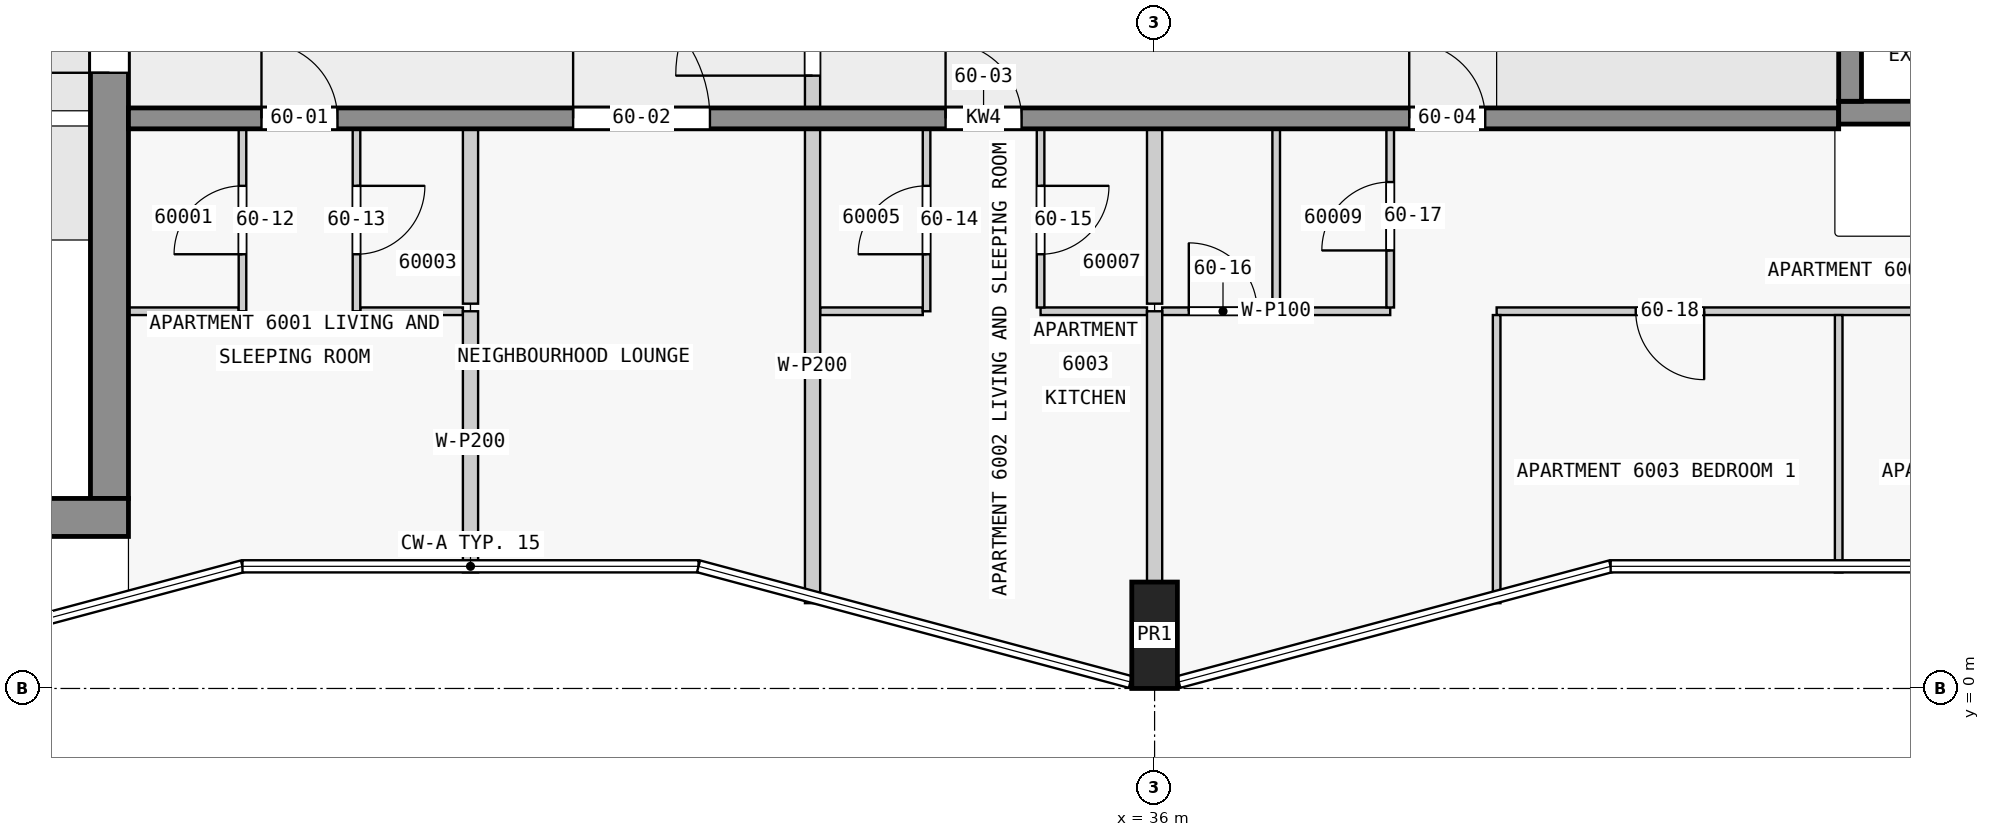
"""IFC4 building model, lengths in metres.
Left out: names, types, materials, properties, quantities, classifications, styles, units other than length and angle.
Written with IfcOpenShell. Run it as: python <this file> out.ifc"""

import sys

from ifc_helpers import new_model, si_unit, direction, frame, frame_2d, origin, origin_2d, place, context, subcontext, project, spatial, rectangle, extrude, element, fill, save


model = new_model("IFC4")
c1 = context("Model", 3, precision=1e-05, world=origin(), true_north=direction((0.0, 1.0)))
c2 = subcontext(c1, "Body", "Model", "MODEL_VIEW")
j1 = project(units=[si_unit("LENGTHUNIT", "METRE"), si_unit("PLANEANGLEUNIT", "RADIAN")], contexts=[c1])
p1 = place(None, origin())
s1 = spatial("IfcSite", under=j1, at=p1, CompositionType="ELEMENT")
p2 = place(p1, origin())
s2 = spatial("IfcBuilding", under=s1, at=p2, CompositionType="ELEMENT")
p3 = place(p2, frame((0.0, 0.0, 229.4)))
s3 = spatial("IfcBuildingStorey", under=s2, at=p3, CompositionType="ELEMENT", Elevation=229.4)
p4 = place(p3, frame((36.0, 0.7, 0.0), z_axis=(0.0, 0.0, 1.0), x_axis=(1.0, 0.0, 0.0)))
e1 = element("IfcColumn", 1, at=p4, inside=s3, PredefinedType="COLUMN", context=c2, shape_type="SweptSolid", body=[
    extrude(rectangle(XDim=0.6, YDim=1.4, at=origin_2d()), origin(), (0.0, 0.0, 1.0), 3.5),
])
p5 = place(p3, frame((1.8, 2.25, 0.0), z_axis=(0.0, 0.0, 1.0), x_axis=(1.0, 0.0, 0.0)))
e2 = element("IfcWall", 2, at=p5, inside=s3, PredefinedType="SHEAR", context=c2, shape_type="SweptSolid", body=[
    extrude(rectangle(XDim=20.7, YDim=0.5, at=frame_2d((10.35, 0.0))), origin(), (0.0, 0.0, 1.0), 3.25),
])
p6 = place(p3, frame((22.25, 2.5, 0.0), z_axis=(0.0, 0.0, 1.0), x_axis=(0.0, 1.0, 0.0)))
e3 = element("IfcWall", 3, at=p6, inside=s3, PredefinedType="SHEAR", context=c2, shape_type="SweptSolid", body=[
    extrude(rectangle(XDim=15.0, YDim=0.5, at=frame_2d((7.5, 0.0))), origin(), (0.0, 0.0, 1.0), 3.25),
])
p7 = place(p6, frame((5.6, 0.0, 0.0)))
e4 = element("IfcOpeningElement", 4, at=p7, cuts=e3, PredefinedType="OPENING", context=c2, shape_type="SweptSolid", body=[
    extrude(rectangle(XDim=1.8, YDim=2.1, at=frame_2d((0.9, 1.05))), frame((0.0, 0.26, 0.0), z_axis=(0.0, -1.0, 0.0), x_axis=(1.0, 0.0, 0.0)), (0.0, 0.0, 1.0), 0.52),
])
p8 = place(p3, frame((45.15, 7.725, 0.0), z_axis=(0.0, 0.0, 1.0), x_axis=(0.0, 1.0, 0.0)))
e5 = element("IfcWall", 5, at=p8, inside=s3, PredefinedType="SHEAR", context=c2, shape_type="SweptSolid", body=[
    extrude(rectangle(XDim=2.55, YDim=0.3, at=frame_2d((1.275, 0.0))), origin(), (0.0, 0.0, 1.0), 3.5),
])
p9 = place(p8, frame((0.725, 0.0, 0.0)))
e6 = element("IfcOpeningElement", 6, at=p9, cuts=e5, PredefinedType="OPENING", context=c2, shape_type="SweptSolid", body=[
    extrude(rectangle(XDim=1.1, YDim=2.1, at=frame_2d((0.55, 1.05))), frame((0.0, 0.16, 0.0), z_axis=(0.0, -1.0, 0.0), x_axis=(1.0, 0.0, 0.0)), (0.0, 0.0, 1.0), 0.32),
])
p10 = place(p3, frame((45.0, 7.575, 0.0), z_axis=(0.0, 0.0, 1.0), x_axis=(1.0, 0.0, 0.0)))
e7 = element("IfcWall", 7, at=p10, inside=s3, PredefinedType="SHEAR", context=c2, shape_type="SweptSolid", body=[
    extrude(rectangle(XDim=7.2, YDim=0.3, at=frame_2d((3.6, 0.0))), origin(), (0.0, 0.0, 1.0), 3.5),
])
p11 = place(p3, frame((22.5, 7.5, 0.0), z_axis=(0.0, 0.0, 1.0), x_axis=(1.0, 0.0, 0.0)))
e8 = element("IfcWall", 8, at=p11, inside=s3, PredefinedType="SHEAR", context=c2, shape_type="SweptSolid", body=[
    extrude(rectangle(XDim=22.5, YDim=0.275, at=frame_2d((11.25, 0.0))), origin(), (0.0, 0.0, 1.0), 3.25),
])
p12 = place(p11, frame((1.75, 0.0, 0.0)))
e9 = element("IfcOpeningElement", 9, at=p12, cuts=e8, PredefinedType="OPENING", context=c2, shape_type="SweptSolid", body=[
    extrude(rectangle(XDim=1.0, YDim=2.1, at=frame_2d((0.5, 1.05))), frame((0.0, 0.147, 0.0), z_axis=(0.0, -1.0, 0.0), x_axis=(1.0, 0.0, 0.0)), (0.0, 0.0, 1.0), 0.295),
])
p13 = place(p11, frame((5.85, 0.0, 0.0)))
e10 = element("IfcOpeningElement", 10, at=p13, cuts=e8, PredefinedType="OPENING", context=c2, shape_type="SweptSolid", body=[
    extrude(rectangle(XDim=1.8, YDim=2.1, at=frame_2d((0.9, 1.05))), frame((0.0, 0.147, 0.0), z_axis=(0.0, -1.0, 0.0), x_axis=(1.0, 0.0, 0.0)), (0.0, 0.0, 1.0), 0.295),
])
p14 = place(p11, frame((10.75, 0.0, 0.0)))
e11 = element("IfcOpeningElement", 11, at=p14, cuts=e8, PredefinedType="OPENING", context=c2, shape_type="SweptSolid", body=[
    extrude(rectangle(XDim=1.0, YDim=2.1, at=frame_2d((0.5, 1.05))), frame((0.0, 0.147, 0.0), z_axis=(0.0, -1.0, 0.0), x_axis=(1.0, 0.0, 0.0)), (0.0, 0.0, 1.0), 0.295),
])
p15 = place(p11, frame((16.85, 0.0, 0.0)))
e12 = element("IfcOpeningElement", 12, at=p15, cuts=e8, PredefinedType="OPENING", context=c2, shape_type="SweptSolid", body=[
    extrude(rectangle(XDim=1.0, YDim=2.1, at=frame_2d((0.5, 1.05))), frame((0.0, 0.147, 0.0), z_axis=(0.0, -1.0, 0.0), x_axis=(1.0, 0.0, 0.0)), (0.0, 0.0, 1.0), 0.295),
])
p16 = place(p3, frame((54.08, 4.962, 0.0), z_axis=(0.0, 0.0, 1.0), x_axis=(-1.0, 0.0, 0.0)))
e13 = element("IfcWall", 13, at=p16, inside=s3, PredefinedType="PARTITIONING", context=c2, shape_type="SweptSolid", body=[
    extrude(rectangle(XDim=13.58, YDim=0.1, at=frame_2d((6.79, 0.0))), origin(), (0.0, 0.0, 1.0), 3.25),
])
p17 = place(p16, frame((10.85, 0.0, 0.0)))
e14 = element("IfcOpeningElement", 14, at=p17, cuts=e13, PredefinedType="OPENING", context=c2, shape_type="SweptSolid", body=[
    extrude(rectangle(XDim=0.9, YDim=2.1, at=frame_2d((0.45, 1.05))), frame((0.0, 0.06, 0.0), z_axis=(0.0, -1.0, 0.0), x_axis=(1.0, 0.0, 0.0)), (0.0, 0.0, 1.0), 0.12),
])
p18 = place(p16, frame((6.45, 0.0, 0.0)))
e15 = element("IfcOpeningElement", 15, at=p18, cuts=e13, PredefinedType="OPENING", context=c2, shape_type="SweptSolid", body=[
    extrude(rectangle(XDim=0.9, YDim=2.1, at=frame_2d((0.45, 1.05))), frame((0.0, 0.06, 0.0), z_axis=(0.0, -1.0, 0.0), x_axis=(1.0, 0.0, 0.0)), (0.0, 0.0, 1.0), 0.12),
])
p19 = place(p16, frame((1.95, 0.0, 0.0)))
e16 = element("IfcOpeningElement", 16, at=p19, cuts=e13, PredefinedType="OPENING", context=c2, shape_type="SweptSolid", body=[
    extrude(rectangle(XDim=0.9, YDim=2.1, at=frame_2d((0.45, 1.05))), frame((0.0, 0.06, 0.0), z_axis=(0.0, -1.0, 0.0), x_axis=(1.0, 0.0, 0.0)), (0.0, 0.0, 1.0), 0.12),
])
p20 = place(p3, frame((22.5, 4.962, 0.0), z_axis=(0.0, 0.0, 1.0), x_axis=(1.0, 0.0, 0.0)))
e17 = element("IfcWall", 17, at=p20, inside=s3, PredefinedType="PARTITIONING", context=c2, shape_type="SweptSolid", body=[
    extrude(rectangle(XDim=1.45, YDim=0.1, at=frame_2d((0.725, 0.0))), origin(), (0.0, 0.0, 1.0), 3.25),
])
for number, where, z_axis, x_axis in (
    (18, (25.55, 4.962, 0.0), (0.0, 0.0, 1.0), (1.0, 0.0, 0.0)),
    (19, (31.6, 4.962, 0.0), (0.0, 0.0, 1.0), (1.0, 0.0, 0.0)),
):
    element("IfcWall", number, at=place(p3, frame(where, z_axis=z_axis, x_axis=x_axis)), inside=s3, PredefinedType="PARTITIONING", context=c2, shape_type="SweptSolid", body=[
        extrude(rectangle(XDim=1.35, YDim=0.1, at=frame_2d((0.675, 0.0))), origin(), (0.0, 0.0, 1.0), 3.25),
    ])
p21 = place(p3, frame((34.5, 4.962, 0.0), z_axis=(0.0, 0.0, 1.0), x_axis=(1.0, 0.0, 0.0)))
e20 = element("IfcWall", 20, at=p21, inside=s3, PredefinedType="PARTITIONING", context=c2, shape_type="SweptSolid", body=[
    extrude(rectangle(XDim=1.4, YDim=0.1, at=frame_2d((0.7, 0.0))), origin(), (0.0, 0.0, 1.0), 3.25),
])
p22 = place(p3, frame((36.1, 4.962, 0.0), z_axis=(0.0, 0.0, 1.0), x_axis=(1.0, 0.0, 0.0)))
e21 = element("IfcWall", 21, at=p22, inside=s3, PredefinedType="PARTITIONING", context=c2, shape_type="SweptSolid", body=[
    extrude(rectangle(XDim=3.0, YDim=0.1, at=frame_2d((1.5, 0.0))), origin(), (0.0, 0.0, 1.0), 3.25),
])
p23 = place(p22, frame((0.35, 0.0, 0.0)))
e22 = element("IfcOpeningElement", 22, at=p23, cuts=e21, PredefinedType="OPENING", context=c2, shape_type="SweptSolid", body=[
    extrude(rectangle(XDim=0.9, YDim=2.1, at=frame_2d((0.45, 1.05))), frame((0.0, 0.06, 0.0), z_axis=(0.0, -1.0, 0.0), x_axis=(1.0, 0.0, 0.0)), (0.0, 0.0, 1.0), 0.12),
])
p24 = place(p3, frame((24.0, 4.962, 0.0), z_axis=(0.0, 0.0, 1.0), x_axis=(0.0, 1.0, 0.0)))
e23 = element("IfcWall", 23, at=p24, inside=s3, PredefinedType="PARTITIONING", context=c2, shape_type="SweptSolid", body=[
    extrude(rectangle(XDim=2.4, YDim=0.1, at=frame_2d((1.2, 0.0))), origin(), (0.0, 0.0, 1.0), 3.25),
])
p25 = place(p24, frame((0.75, 0.0, 0.0)))
e24 = element("IfcOpeningElement", 24, at=p25, cuts=e23, PredefinedType="OPENING", context=c2, shape_type="SweptSolid", body=[
    extrude(rectangle(XDim=0.9, YDim=2.1, at=frame_2d((0.45, 1.05))), frame((0.0, 0.06, 0.0), z_axis=(0.0, -1.0, 0.0), x_axis=(1.0, 0.0, 0.0)), (0.0, 0.0, 1.0), 0.12),
])
p26 = place(p3, frame((25.5, 7.363, 0.0), z_axis=(0.0, 0.0, 1.0), x_axis=(0.0, -1.0, 0.0)))
e25 = element("IfcWall", 25, at=p26, inside=s3, PredefinedType="PARTITIONING", context=c2, shape_type="SweptSolid", body=[
    extrude(rectangle(XDim=2.4, YDim=0.1, at=frame_2d((1.2, 0.0))), origin(), (0.0, 0.0, 1.0), 3.25),
])
p27 = place(p26, frame((0.75, 0.0, 0.0)))
e26 = element("IfcOpeningElement", 26, at=p27, cuts=e25, PredefinedType="OPENING", context=c2, shape_type="SweptSolid", body=[
    extrude(rectangle(XDim=0.9, YDim=2.1, at=frame_2d((0.45, 1.05))), frame((0.0, 0.06, 0.0), z_axis=(0.0, -1.0, 0.0), x_axis=(1.0, 0.0, 0.0)), (0.0, 0.0, 1.0), 0.12),
])
p28 = place(p3, frame((27.0, 4.962, 0.0), z_axis=(0.0, 0.0, 1.0), x_axis=(0.0, -1.0, 0.0)))
e27 = element("IfcWall", 27, at=p28, inside=s3, PredefinedType="PARTITIONING", context=c2, shape_type="SweptSolid", body=[
    extrude(rectangle(XDim=3.436, YDim=0.2, at=frame_2d((1.718, 0.0))), origin(), (0.0, 0.0, 1.0), 3.25),
])
p29 = place(p3, frame((27.0, 5.062, 0.0), z_axis=(0.0, 0.0, 1.0), x_axis=(0.0, 1.0, 0.0)))
e28 = element("IfcWall", 28, at=p29, inside=s3, PredefinedType="PARTITIONING", context=c2, shape_type="SweptSolid", body=[
    extrude(rectangle(XDim=2.3, YDim=0.2, at=frame_2d((1.15, 0.0))), origin(), (0.0, 0.0, 1.0), 3.25),
])
p30 = place(p3, frame((31.5, 1.122, 0.0), z_axis=(0.0, 0.0, 1.0), x_axis=(0.0, 1.0, 0.0)))
e29 = element("IfcWall", 29, at=p30, inside=s3, PredefinedType="PARTITIONING", context=c2, shape_type="SweptSolid", body=[
    extrude(rectangle(XDim=6.24, YDim=0.2, at=frame_2d((3.12, 0.0))), origin(), (0.0, 0.0, 1.0), 3.25),
])
p31 = place(p3, frame((33.0, 4.962, 0.0), z_axis=(0.0, 0.0, 1.0), x_axis=(0.0, 1.0, 0.0)))
e30 = element("IfcWall", 30, at=p31, inside=s3, PredefinedType="PARTITIONING", context=c2, shape_type="SweptSolid", body=[
    extrude(rectangle(XDim=2.4, YDim=0.1, at=frame_2d((1.2, 0.0))), origin(), (0.0, 0.0, 1.0), 3.25),
])
p32 = place(p31, frame((0.75, 0.0, 0.0)))
e31 = element("IfcOpeningElement", 31, at=p32, cuts=e30, PredefinedType="OPENING", context=c2, shape_type="SweptSolid", body=[
    extrude(rectangle(XDim=0.9, YDim=2.1, at=frame_2d((0.45, 1.05))), frame((0.0, 0.06, 0.0), z_axis=(0.0, -1.0, 0.0), x_axis=(1.0, 0.0, 0.0)), (0.0, 0.0, 1.0), 0.12),
])
p33 = place(p3, frame((34.5, 7.363, 0.0), z_axis=(0.0, 0.0, 1.0), x_axis=(0.0, -1.0, 0.0)))
e32 = element("IfcWall", 32, at=p33, inside=s3, PredefinedType="PARTITIONING", context=c2, shape_type="SweptSolid", body=[
    extrude(rectangle(XDim=2.35, YDim=0.1, at=frame_2d((1.175, 0.0))), origin(), (0.0, 0.0, 1.0), 3.25),
])
p34 = place(p33, frame((0.75, 0.0, 0.0)))
e33 = element("IfcOpeningElement", 33, at=p34, cuts=e32, PredefinedType="OPENING", context=c2, shape_type="SweptSolid", body=[
    extrude(rectangle(XDim=0.9, YDim=2.1, at=frame_2d((0.45, 1.05))), frame((0.0, 0.06, 0.0), z_axis=(0.0, -1.0, 0.0), x_axis=(1.0, 0.0, 0.0)), (0.0, 0.0, 1.0), 0.12),
])
p35 = place(p3, frame((36.0, 4.962, 0.0), z_axis=(0.0, 0.0, 1.0), x_axis=(0.0, -1.0, 0.0)))
e34 = element("IfcWall", 34, at=p35, inside=s3, PredefinedType="PARTITIONING", context=c2, shape_type="SweptSolid", body=[
    extrude(rectangle(XDim=3.562, YDim=0.2, at=frame_2d((1.781, 0.0))), origin(), (0.0, 0.0, 1.0), 3.25),
])
p36 = place(p3, frame((36.0, 5.062, 0.0), z_axis=(0.0, 0.0, 1.0), x_axis=(0.0, 1.0, 0.0)))
e35 = element("IfcWall", 35, at=p36, inside=s3, PredefinedType="PARTITIONING", context=c2, shape_type="SweptSolid", body=[
    extrude(rectangle(XDim=2.3, YDim=0.2, at=frame_2d((1.15, 0.0))), origin(), (0.0, 0.0, 1.0), 3.25),
])
p37 = place(p3, frame((37.6, 5.012, 0.0), z_axis=(0.0, 0.0, 1.0), x_axis=(0.0, 1.0, 0.0)))
e36 = element("IfcWall", 36, at=p37, inside=s3, PredefinedType="PARTITIONING", context=c2, shape_type="SweptSolid", body=[
    extrude(rectangle(XDim=2.35, YDim=0.1, at=frame_2d((1.175, 0.0))), origin(), (0.0, 0.0, 1.0), 3.25),
])
p38 = place(p3, frame((39.1, 5.012, 0.0), z_axis=(0.0, 0.0, 1.0), x_axis=(0.0, 1.0, 0.0)))
e37 = element("IfcWall", 37, at=p38, inside=s3, PredefinedType="PARTITIONING", context=c2, shape_type="SweptSolid", body=[
    extrude(rectangle(XDim=2.35, YDim=0.1, at=frame_2d((1.175, 0.0))), origin(), (0.0, 0.0, 1.0), 3.25),
])
p39 = place(p38, frame((0.75, 0.0, 0.0)))
e38 = element("IfcOpeningElement", 38, at=p39, cuts=e37, PredefinedType="OPENING", context=c2, shape_type="SweptSolid", body=[
    extrude(rectangle(XDim=0.9, YDim=2.1, at=frame_2d((0.45, 1.05))), frame((0.0, 0.06, 0.0), z_axis=(0.0, -1.0, 0.0), x_axis=(1.0, 0.0, 0.0)), (0.0, 0.0, 1.0), 0.12),
])
p40 = place(p3, frame((40.5, 4.913, 0.0), z_axis=(0.0, 0.0, 1.0), x_axis=(0.0, -1.0, 0.0)))
e39 = element("IfcWall", 39, at=p40, inside=s3, PredefinedType="PARTITIONING", context=c2, shape_type="SweptSolid", body=[
    extrude(rectangle(XDim=3.79, YDim=0.1, at=frame_2d((1.895, 0.0))), origin(), (0.0, 0.0, 1.0), 3.25),
])
p41 = place(p3, frame((45.0, 1.527, 0.0), z_axis=(0.0, 0.0, 1.0), x_axis=(0.0, 1.0, 0.0)))
e40 = element("IfcWall", 40, at=p41, inside=s3, PredefinedType="PARTITIONING", context=c2, shape_type="SweptSolid", body=[
    extrude(rectangle(XDim=3.386, YDim=0.1, at=frame_2d((1.693, 0.0))), origin(), (0.0, 0.0, 1.0), 3.25),
])
p42 = place(p3, frame((31.5, 7.462, 0.0), z_axis=(0.0, 0.0, 1.0), x_axis=(0.0, 1.0, 0.0)))
e41 = element("IfcWall", 41, at=p42, inside=s3, PredefinedType="PARTITIONING", context=c2, shape_type="SweptSolid", body=[
    extrude(rectangle(XDim=3.075, YDim=0.2, at=frame_2d((1.538, 0.0))), origin(), (0.0, 0.0, 1.0), 3.25),
])
p43 = place(p42, frame((0.6, 0.0, 0.0)))
e42 = element("IfcOpeningElement", 42, at=p43, cuts=e41, PredefinedType="OPENING", context=c2, shape_type="SweptSolid", body=[
    extrude(rectangle(XDim=1.8, YDim=2.1, at=frame_2d((0.9, 1.05))), frame((0.0, 0.11, 0.0), z_axis=(0.0, -1.0, 0.0), x_axis=(1.0, 0.0, 0.0)), (0.0, 0.0, 1.0), 0.22),
])
p44 = place(p7, origin())
e43 = element("IfcDoor", 43, at=p44, inside=s3, OperationType="DOUBLE_DOOR_SINGLE_SWING", PredefinedType="DOOR", context=c2, shape_type="SweptSolid", body=[
    extrude(rectangle(XDim=1.8, YDim=2.1, at=frame_2d((0.9, 1.05))), frame((0.0, 0.025, 0.0), z_axis=(0.0, -1.0, 0.0), x_axis=(1.0, 0.0, 0.0)), (0.0, 0.0, 1.0), 0.05),
])
fill(e4, e43)
p45 = place(p12, origin())
e44 = element("IfcDoor", 44, at=p45, inside=s3, OperationType="SINGLE_SWING_LEFT", PredefinedType="DOOR", context=c2, shape_type="SweptSolid", body=[
    extrude(rectangle(XDim=1.0, YDim=2.1, at=frame_2d((0.5, 1.05))), frame((0.0, 0.025, 0.0), z_axis=(0.0, -1.0, 0.0), x_axis=(1.0, 0.0, 0.0)), (0.0, 0.0, 1.0), 0.05),
])
fill(e9, e44)
p46 = place(p13, origin())
e45 = element("IfcDoor", 45, at=p46, inside=s3, OperationType="SINGLE_SWING_LEFT", PredefinedType="DOOR", context=c2, shape_type="SweptSolid", body=[
    extrude(rectangle(XDim=1.8, YDim=2.1, at=frame_2d((0.9, 1.05))), frame((0.0, 0.025, 0.0), z_axis=(0.0, -1.0, 0.0), x_axis=(1.0, 0.0, 0.0)), (0.0, 0.0, 1.0), 0.05),
])
fill(e10, e45)
p47 = place(p14, origin())
e46 = element("IfcDoor", 46, at=p47, inside=s3, OperationType="SINGLE_SWING_LEFT", PredefinedType="DOOR", context=c2, shape_type="SweptSolid", body=[
    extrude(rectangle(XDim=1.0, YDim=2.1, at=frame_2d((0.5, 1.05))), frame((0.0, 0.025, 0.0), z_axis=(0.0, -1.0, 0.0), x_axis=(1.0, 0.0, 0.0)), (0.0, 0.0, 1.0), 0.05),
])
fill(e11, e46)
p48 = place(p15, origin())
e47 = element("IfcDoor", 47, at=p48, inside=s3, OperationType="SINGLE_SWING_RIGHT", PredefinedType="DOOR", context=c2, shape_type="SweptSolid", body=[
    extrude(rectangle(XDim=1.0, YDim=2.1, at=frame_2d((0.5, 1.05))), frame((0.0, 0.025, 0.0), z_axis=(0.0, -1.0, 0.0), x_axis=(1.0, 0.0, 0.0)), (0.0, 0.0, 1.0), 0.05),
])
fill(e12, e47)
p49 = place(p43, origin())
e48 = element("IfcDoor", 48, at=p49, inside=s3, OperationType="SINGLE_SWING_LEFT", PredefinedType="DOOR", context=c2, shape_type="SweptSolid", body=[
    extrude(rectangle(XDim=1.8, YDim=2.1, at=frame_2d((0.9, 1.05))), frame((0.0, 0.025, 0.0), z_axis=(0.0, -1.0, 0.0), x_axis=(1.0, 0.0, 0.0)), (0.0, 0.0, 1.0), 0.05),
])
fill(e42, e48)
p50 = place(p25, origin())
e49 = element("IfcDoor", 49, at=p50, inside=s3, OperationType="SINGLE_SWING_RIGHT", PredefinedType="DOOR", context=c2, shape_type="SweptSolid", body=[
    extrude(rectangle(XDim=0.9, YDim=2.1, at=frame_2d((0.45, 1.05))), frame((0.0, 0.025, 0.0), z_axis=(0.0, -1.0, 0.0), x_axis=(1.0, 0.0, 0.0)), (0.0, 0.0, 1.0), 0.05),
])
fill(e24, e49)
p51 = place(p27, origin())
e50 = element("IfcDoor", 50, at=p51, inside=s3, OperationType="SINGLE_SWING_RIGHT", PredefinedType="DOOR", context=c2, shape_type="SweptSolid", body=[
    extrude(rectangle(XDim=0.9, YDim=2.1, at=frame_2d((0.45, 1.05))), frame((0.0, 0.025, 0.0), z_axis=(0.0, -1.0, 0.0), x_axis=(1.0, 0.0, 0.0)), (0.0, 0.0, 1.0), 0.05),
])
fill(e26, e50)
p52 = place(p32, origin())
e51 = element("IfcDoor", 51, at=p52, inside=s3, OperationType="SINGLE_SWING_RIGHT", PredefinedType="DOOR", context=c2, shape_type="SweptSolid", body=[
    extrude(rectangle(XDim=0.9, YDim=2.1, at=frame_2d((0.45, 1.05))), frame((0.0, 0.025, 0.0), z_axis=(0.0, -1.0, 0.0), x_axis=(1.0, 0.0, 0.0)), (0.0, 0.0, 1.0), 0.05),
])
fill(e31, e51)
p53 = place(p34, origin())
e52 = element("IfcDoor", 52, at=p53, inside=s3, OperationType="SINGLE_SWING_RIGHT", PredefinedType="DOOR", context=c2, shape_type="SweptSolid", body=[
    extrude(rectangle(XDim=0.9, YDim=2.1, at=frame_2d((0.45, 1.05))), frame((0.0, 0.025, 0.0), z_axis=(0.0, -1.0, 0.0), x_axis=(1.0, 0.0, 0.0)), (0.0, 0.0, 1.0), 0.05),
])
fill(e33, e52)
p54 = place(p23, origin())
e53 = element("IfcDoor", 53, at=p54, inside=s3, OperationType="SINGLE_SWING_LEFT", PredefinedType="DOOR", context=c2, shape_type="SweptSolid", body=[
    extrude(rectangle(XDim=0.9, YDim=2.1, at=frame_2d((0.45, 1.05))), frame((0.0, 0.025, 0.0), z_axis=(0.0, -1.0, 0.0), x_axis=(1.0, 0.0, 0.0)), (0.0, 0.0, 1.0), 0.05),
])
fill(e22, e53)
p55 = place(p39, origin())
e54 = element("IfcDoor", 54, at=p55, inside=s3, OperationType="SINGLE_SWING_RIGHT", PredefinedType="DOOR", context=c2, shape_type="SweptSolid", body=[
    extrude(rectangle(XDim=0.9, YDim=2.1, at=frame_2d((0.45, 1.05))), frame((0.0, 0.025, 0.0), z_axis=(0.0, -1.0, 0.0), x_axis=(1.0, 0.0, 0.0)), (0.0, 0.0, 1.0), 0.05),
])
fill(e38, e54)
p56 = place(p17, origin())
e55 = element("IfcDoor", 55, at=p56, inside=s3, OperationType="SINGLE_SWING_RIGHT", PredefinedType="DOOR", context=c2, shape_type="SweptSolid", body=[
    extrude(rectangle(XDim=0.9, YDim=2.1, at=frame_2d((0.45, 1.05))), frame((0.0, 0.025, 0.0), z_axis=(0.0, -1.0, 0.0), x_axis=(1.0, 0.0, 0.0)), (0.0, 0.0, 1.0), 0.05),
])
fill(e14, e55)
save(model, sys.argv[1])
